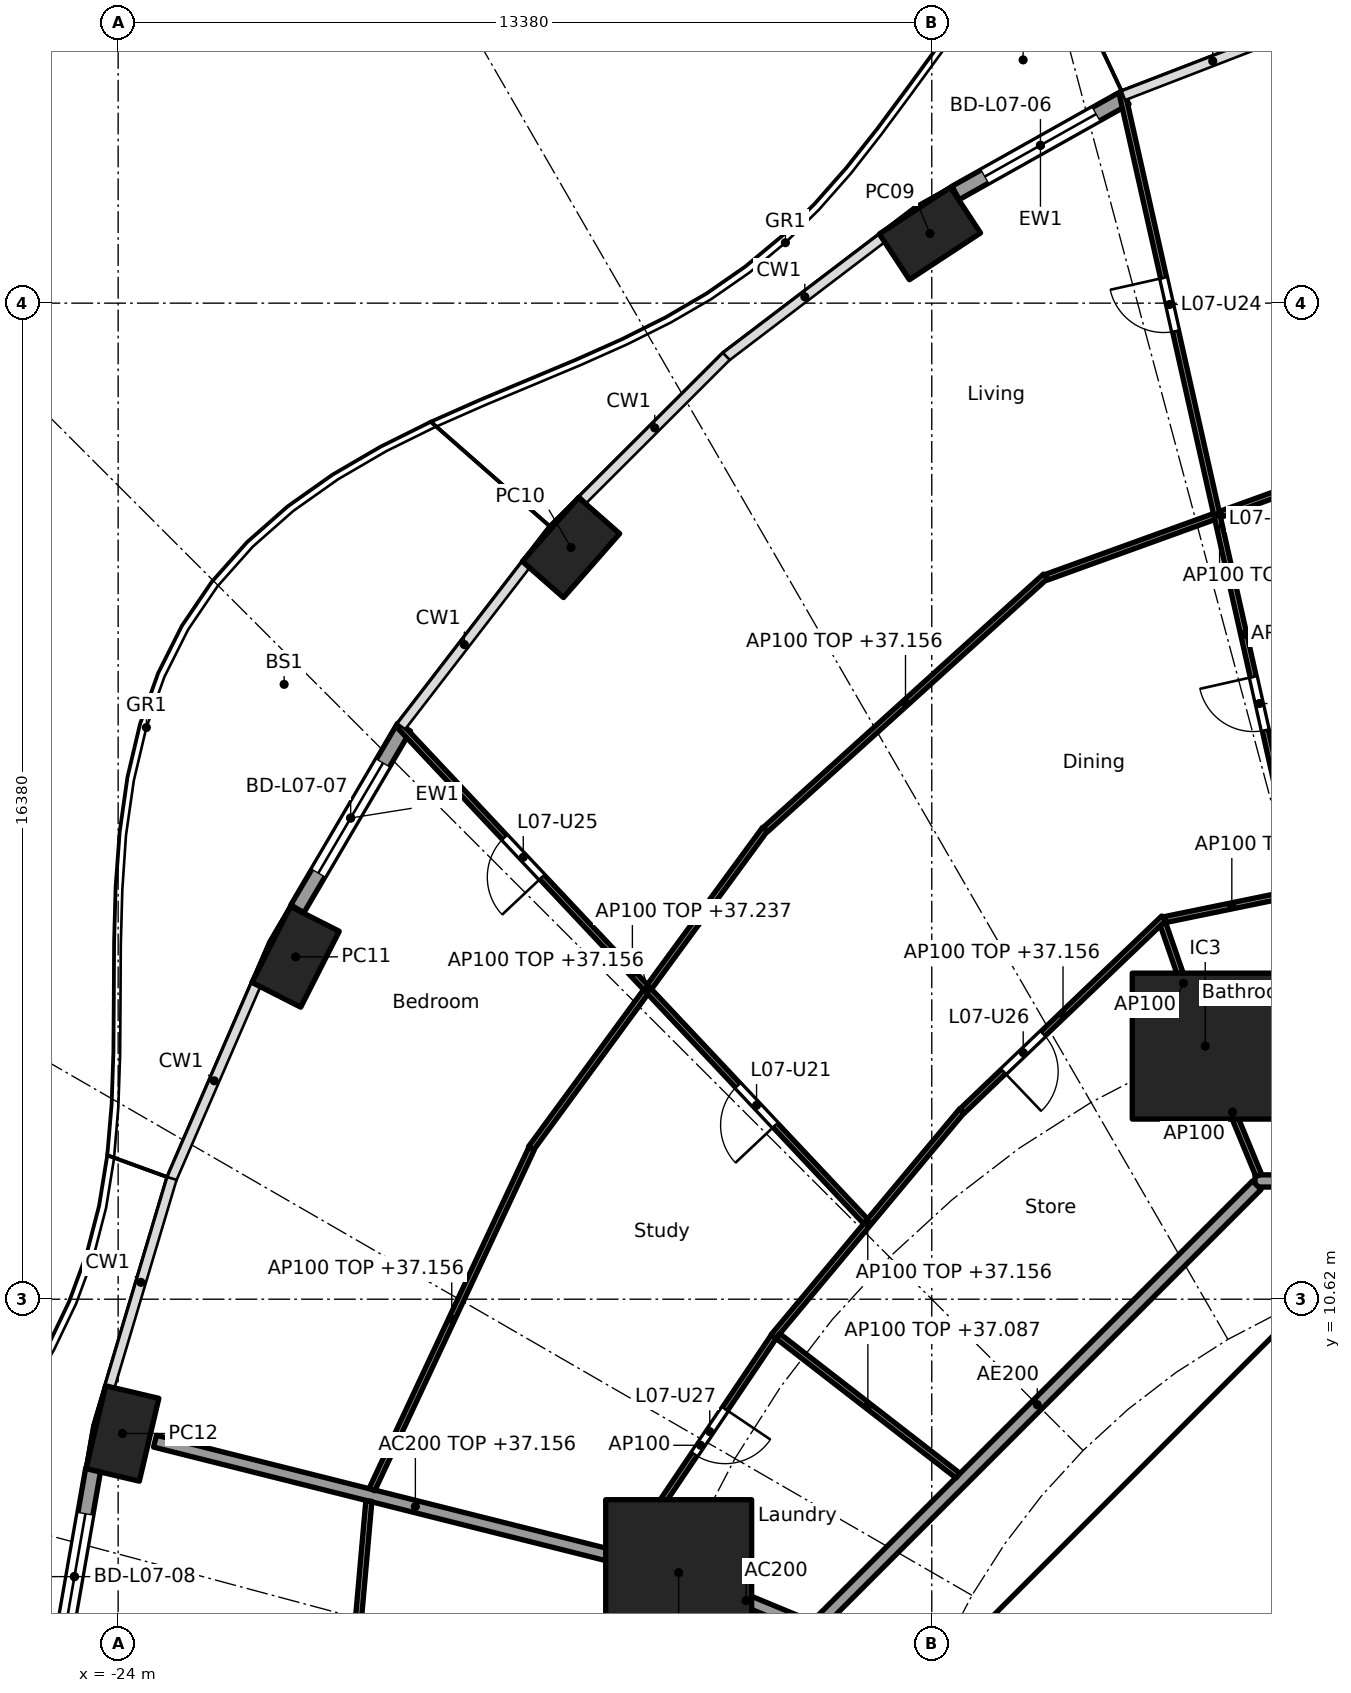
"""IFC4 building model, lengths in metres.
Left out: names, types, materials, properties, quantities, classifications, styles, units other than length and angle.
Written with IfcOpenShell. Run it as: python <this file> out.ifc"""

import sys

from ifc_helpers import new_model, si_unit, direction, frame, frame_2d, origin, origin_2d, place, context, subcontext, project, spatial, rectangle, hollow_rectangle, extrude, element, fill, save


model = new_model("IFC4")
c1 = context("Model", 3, precision=1e-05, world=origin(), true_north=direction((0.0, 1.0)))
c2 = subcontext(c1, "Body", "Model", "MODEL_VIEW")
j1 = project(units=[si_unit("LENGTHUNIT", "METRE"), si_unit("PLANEANGLEUNIT", "RADIAN")], contexts=[c1])
p1 = place(None, origin())
s1 = spatial("IfcSite", under=j1, at=p1, CompositionType="ELEMENT")
p2 = place(p1, origin())
s2 = spatial("IfcBuilding", under=s1, at=p2, CompositionType="ELEMENT")
p3 = place(p2, frame((0.0, 0.0, 34.4)))
s3 = spatial("IfcBuildingStorey", under=s2, at=p3, CompositionType="ELEMENT", Elevation=34.4)
for number, where, z_axis, x_axis in (
    (1, (-10.65, 28.146, 0.0), (0.0, 0.0, 1.0), (-0.836, -0.549, 0.0)),
    (2, (-16.552, 22.981, 0.0), (0.0, 0.0, 1.0), (-0.66, -0.751, 0.0)),
    (3, (-21.082, 16.25, 0.0), (0.0, 0.0, 1.0), (-0.452, -0.892, 0.0)),
    (4, (-23.929, 8.412, 0.0), (0.0, 0.0, 1.0), (-0.229, -0.973, 0.0)),
):
    element("IfcColumn", number, at=place(p3, frame(where, z_axis=z_axis, x_axis=x_axis)), inside=s3, PredefinedType="COLUMN", context=c2, shape_type="SweptSolid", body=[
        extrude(hollow_rectangle(XDim=1.4, YDim=0.9, WallThickness=0.05, at=origin_2d()), origin(), (0.0, 0.0, 1.0), 3.7),
    ])
for number, where, z_axis, x_axis in (
    (5, (-6.123, 14.782, 0.0), (0.0, 0.0, 1.0), (1.0, 0.0, 0.0)),
    (6, (-14.782, 6.123, 0.0), (0.0, 0.0, 1.0), (1.0, 0.0, 0.0)),
):
    element("IfcColumn", number, at=place(p3, frame(where, z_axis=z_axis, x_axis=x_axis)), inside=s3, PredefinedType="COLUMN", context=c2, shape_type="SweptSolid", body=[
        extrude(rectangle(XDim=2.4, YDim=2.4, at=origin_2d()), origin(), (0.0, 0.0, 1.0), 3.7),
    ])
p4 = place(p3, frame((-10.228, 28.812, 0.0), z_axis=(0.0, 0.0, 1.0), x_axis=(0.872084295691, 0.489355679653, 0.0)))
e7 = element("IfcWall", 7, at=p4, inside=s3, PredefinedType="SOLIDWALL", context=c2, shape_type="SweptSolid", body=[
    extrude(rectangle(XDim=3.201, YDim=0.25, at=frame_2d((1.601, 0.0))), origin(), (0.0, 0.0, 1.0), 3.44),
])
p5 = place(p4, frame((0.551, 0.0, 0.0)))
e8 = element("IfcOpeningElement", 8, at=p5, cuts=e7, PredefinedType="OPENING", context=c2, shape_type="SweptSolid", body=[
    extrude(rectangle(XDim=2.1, YDim=2.4, at=frame_2d((1.05, 1.2))), frame((0.0, 0.135, 0.0), z_axis=(0.0, -1.0, 0.0), x_axis=(1.0, 0.0, 0.0)), (0.0, 0.0, 1.0), 0.27),
])
p6 = place(p3, frame((-21.052, 17.04, 0.0), z_axis=(0.0, 0.0, 1.0), x_axis=(0.506311160839, 0.862350861546, 0.0)))
e9 = element("IfcWall", 9, at=p6, inside=s3, PredefinedType="SOLIDWALL", context=c2, shape_type="SweptSolid", body=[
    extrude(rectangle(XDim=3.462, YDim=0.25, at=frame_2d((1.731, 0.0))), origin(), (0.0, 0.0, 1.0), 3.44),
])
p7 = place(p6, frame((0.681, 0.0, 0.0)))
e10 = element("IfcOpeningElement", 10, at=p7, cuts=e9, PredefinedType="OPENING", context=c2, shape_type="SweptSolid", body=[
    extrude(rectangle(XDim=2.1, YDim=2.4, at=frame_2d((1.05, 1.2))), frame((0.0, 0.135, 0.0), z_axis=(0.0, -1.0, 0.0), x_axis=(1.0, 0.0, 0.0)), (0.0, 0.0, 1.0), 0.27),
])
p8 = place(p3, frame((-25.029, 4.286, 0.0), z_axis=(0.0, 0.0, 1.0), x_axis=(0.172217377323, 0.98505897029, 0.0)))
e11 = element("IfcWall", 11, at=p8, inside=s3, PredefinedType="SOLIDWALL", context=c2, shape_type="SweptSolid", body=[
    extrude(rectangle(XDim=3.598, YDim=0.25, at=frame_2d((1.799, 0.0))), origin(), (0.0, 0.0, 1.0), 3.44),
])
p9 = place(p8, frame((0.749, 0.0, 0.0)))
e12 = element("IfcOpeningElement", 12, at=p9, cuts=e11, PredefinedType="OPENING", context=c2, shape_type="SweptSolid", body=[
    extrude(rectangle(XDim=2.1, YDim=2.4, at=frame_2d((1.05, 1.2))), frame((0.0, 0.135, 0.0), z_axis=(0.0, -1.0, 0.0), x_axis=(1.0, 0.0, 0.0)), (0.0, 0.0, 1.0), 0.27),
])
p10 = place(p3, frame((-4.613, 9.988, 0.0), z_axis=(0.0, 0.0, 1.0), x_axis=(-0.707106781187, -0.707106781187, 0.0)))
e13 = element("IfcWall", 13, at=p10, inside=s3, PredefinedType="SHEAR", context=c2, shape_type="SweptSolid", body=[
    extrude(rectangle(XDim=7.602, YDim=0.6, at=frame_2d((3.801, 0.0))), origin(), (0.0, 0.0, 1.0), 3.44),
])
p11 = place(p10, frame((0.351, 0.0, 0.0)))
e14 = element("IfcOpeningElement", 14, at=p11, cuts=e13, PredefinedType="OPENING", context=c2, shape_type="SweptSolid", body=[
    extrude(rectangle(XDim=1.1, YDim=2.1, at=frame_2d((0.55, 1.05))), frame((0.0, 0.31, 0.0), z_axis=(0.0, -1.0, 0.0), x_axis=(1.0, 0.0, 0.0)), (0.0, 0.0, 1.0), 0.62),
])
p12 = place(p3, frame((-6.2, 4.3, 0.0), z_axis=(0.0, 0.0, 1.0), x_axis=(0.0, 1.0, 0.0)))
e15 = element("IfcWall", 15, at=p12, inside=s3, PredefinedType="PARTITIONING", context=c2, shape_type="SweptSolid", body=[
    extrude(rectangle(XDim=3.527, YDim=0.15, at=frame_2d((1.763, 0.0))), origin(), (0.0, 0.0, 1.0), 3.44),
])
p13 = place(p12, frame((0.262, 0.0, 0.0)))
e16 = element("IfcOpeningElement", 16, at=p13, cuts=e15, PredefinedType="OPENING", context=c2, shape_type="SweptSolid", body=[
    extrude(rectangle(XDim=0.9, YDim=2.1, at=frame_2d((0.45, 1.05))), frame((0.0, 0.085, 0.0), z_axis=(0.0, -1.0, 0.0), x_axis=(1.0, 0.0, 0.0)), (0.0, 0.0, 1.0), 0.17),
])
p14 = place(p12, frame((2.138, 0.0, 0.0)))
e17 = element("IfcOpeningElement", 17, at=p14, cuts=e15, PredefinedType="OPENING", context=c2, shape_type="SweptSolid", body=[
    extrude(rectangle(XDim=0.9, YDim=2.1, at=frame_2d((0.45, 1.05))), frame((0.0, 0.085, 0.0), z_axis=(0.0, -1.0, 0.0), x_axis=(1.0, 0.0, 0.0)), (0.0, 0.0, 1.0), 0.17),
])
p15 = place(p3, frame((-8.301, 5.8, 0.0), z_axis=(0.0, 0.0, 1.0), x_axis=(1.0, 0.0, 0.0)))
e18 = element("IfcWall", 18, at=p15, inside=s3, PredefinedType="PARTITIONING", context=c2, shape_type="SweptSolid", body=[
    extrude(rectangle(XDim=2.026, YDim=0.15, at=frame_2d((1.013, 0.0))), origin(), (0.0, 0.0, 1.0), 3.44),
])
p16 = place(p3, frame((-12.657, 5.243, 0.0), z_axis=(0.0, 0.0, 1.0), x_axis=(-0.923885664896, 0.382668627144, 0.0)))
e19 = element("IfcWall", 19, at=p16, inside=s3, PredefinedType="PARTITIONING", context=c2, shape_type="SweptSolid", body=[
    extrude(rectangle(XDim=2.2, YDim=0.2, at=frame_2d((1.1, 0.0))), origin(), (0.0, 0.0, 1.0), 3.44),
])
p17 = place(p3, frame((-14.831, 6.135, 0.0), z_axis=(0.0, 0.0, 1.0), x_axis=(-0.969884949569, 0.243563512454, 0.0)))
e20 = element("IfcWall", 20, at=p17, inside=s3, PredefinedType="PARTITIONING", context=c2, shape_type="SweptSolid", body=[
    extrude(rectangle(XDim=8.829, YDim=0.2, at=frame_2d((4.415, 0.0))), origin(), (0.0, 0.0, 1.0), 2.756),
])
p18 = place(p3, frame((5.104, 12.565, 0.0), z_axis=(0.0, 0.0, 1.0), x_axis=(-1.0, 0.0, 0.0)))
e21 = element("IfcWall", 21, at=p18, inside=s3, PredefinedType="PARTITIONING", context=c2, shape_type="SweptSolid", body=[
    extrude(rectangle(XDim=10.409, YDim=0.2, at=frame_2d((5.205, 0.0))), origin(), (0.0, 0.0, 1.0), 3.44),
])
p19 = place(p18, frame((6.339, 0.0, 0.0)))
e22 = element("IfcOpeningElement", 22, at=p19, cuts=e21, PredefinedType="OPENING", context=c2, shape_type="SweptSolid", body=[
    extrude(rectangle(XDim=1.0, YDim=2.1, at=frame_2d((0.5, 1.05))), frame((0.0, 0.11, 0.0), z_axis=(0.0, -1.0, 0.0), x_axis=(1.0, 0.0, 0.0)), (0.0, 0.0, 1.0), 0.22),
])
p20 = place(p3, frame((-5.275, 12.494, 0.0), z_axis=(0.0, 0.0, 1.0), x_axis=(-0.707106781187, -0.707106781187, 0.0)))
e23 = element("IfcWall", 23, at=p20, inside=s3, PredefinedType="PARTITIONING", context=c2, shape_type="SweptSolid", body=[
    extrude(rectangle(XDim=10.209, YDim=0.2, at=frame_2d((5.104, 0.0))), origin(), (0.0, 0.0, 1.0), 3.44),
])
p21 = place(p3, frame((-3.034, 24.554, 0.0), z_axis=(0.0, 0.0, 1.0), x_axis=(-0.940401691072, -0.340065669288, 0.0)))
e24 = element("IfcWall", 24, at=p21, inside=s3, PredefinedType="PARTITIONING", context=c2, shape_type="SweptSolid", body=[
    extrude(rectangle(XDim=6.067, YDim=0.1, at=frame_2d((3.034, 0.0))), origin(), (0.0, 0.0, 1.0), 2.756),
])
p22 = place(p21, frame((1.117, 0.0, 0.0)))
e25 = element("IfcOpeningElement", 25, at=p22, cuts=e24, PredefinedType="OPENING", context=c2, shape_type="SweptSolid", body=[
    extrude(rectangle(XDim=0.9, YDim=2.1, at=frame_2d((0.45, 1.05))), frame((0.0, 0.06, 0.0), z_axis=(0.0, -1.0, 0.0), x_axis=(1.0, 0.0, 0.0)), (0.0, 0.0, 1.0), 0.12),
])
p23 = place(p3, frame((-3.492, 12.662, 0.0), z_axis=(0.0, 0.0, 1.0), x_axis=(-0.219268088006, 0.975664648115, 0.0)))
e26 = element("IfcWall", 26, at=p23, inside=s3, PredefinedType="PARTITIONING", context=c2, shape_type="SweptSolid", body=[
    extrude(rectangle(XDim=18.23, YDim=0.1, at=frame_2d((9.115, 0.0))), origin(), (0.0, 0.0, 1.0), 2.687),
])
p24 = place(p23, frame((0.35, 0.0, 0.0)))
e27 = element("IfcOpeningElement", 27, at=p24, cuts=e26, PredefinedType="OPENING", context=c2, shape_type="SweptSolid", body=[
    extrude(rectangle(XDim=0.9, YDim=2.1, at=frame_2d((0.45, 1.05))), frame((0.0, 0.06, 0.0), z_axis=(0.0, -1.0, 0.0), x_axis=(1.0, 0.0, 0.0)), (0.0, 0.0, 1.0), 0.12),
])
p25 = place(p23, frame((7.497, 0.0, 0.0)))
e28 = element("IfcOpeningElement", 28, at=p25, cuts=e26, PredefinedType="OPENING", context=c2, shape_type="SweptSolid", body=[
    extrude(rectangle(XDim=0.9, YDim=2.1, at=frame_2d((0.45, 1.05))), frame((0.0, 0.06, 0.0), z_axis=(0.0, -1.0, 0.0), x_axis=(1.0, 0.0, 0.0)), (0.0, 0.0, 1.0), 0.12),
])
p26 = place(p23, frame((14.223, 0.0, 0.0)))
e29 = element("IfcOpeningElement", 29, at=p26, cuts=e26, PredefinedType="OPENING", context=c2, shape_type="SweptSolid", body=[
    extrude(rectangle(XDim=0.9, YDim=2.1, at=frame_2d((0.45, 1.05))), frame((0.0, 0.06, 0.0), z_axis=(0.0, -1.0, 0.0), x_axis=(1.0, 0.0, 0.0)), (0.0, 0.0, 1.0), 0.12),
])
p27 = place(p3, frame((-4.58, 17.315, 0.0), z_axis=(0.0, 0.0, 1.0), x_axis=(-0.979581941859, -0.201045316246, 0.0)))
e30 = element("IfcWall", 30, at=p27, inside=s3, PredefinedType="PARTITIONING", context=c2, shape_type="SweptSolid", body=[
    extrude(rectangle(XDim=2.256, YDim=0.1, at=frame_2d((1.128, 0.0))), origin(), (0.0, 0.0, 1.0), 2.756),
])
p28 = place(p3, frame((-5.243, 12.657, 0.0), z_axis=(0.0, 0.0, 1.0), x_axis=(-0.382719158442, 0.923864733477, 0.0)))
e31 = element("IfcWall", 31, at=p28, inside=s3, PredefinedType="PARTITIONING", context=c2, shape_type="SweptSolid", body=[
    extrude(rectangle(XDim=2.25, YDim=0.1, at=frame_2d((1.125, 0.0))), origin(), (0.0, 0.0, 1.0), 3.44),
])
p29 = place(p3, frame((-6.139, 14.83, 0.0), z_axis=(0.0, 0.0, 1.0), x_axis=(-0.327246993321, 0.944938836837, 0.0)))
e32 = element("IfcWall", 32, at=p29, inside=s3, PredefinedType="PARTITIONING", context=c2, shape_type="SweptSolid", body=[
    extrude(rectangle(XDim=2.09, YDim=0.1, at=frame_2d((1.045, 0.0))), origin(), (0.0, 0.0, 1.0), 3.44),
])
p30 = place(p3, frame((-6.803, 16.886, 0.0), z_axis=(0.0, 0.0, 1.0), x_axis=(-0.722763212502, -0.69109575216, 0.0)))
e33 = element("IfcWall", 33, at=p30, inside=s3, PredefinedType="PARTITIONING", context=c2, shape_type="SweptSolid", body=[
    extrude(rectangle(XDim=4.587, YDim=0.1, at=frame_2d((2.293, 0.0))), origin(), (0.0, 0.0, 1.0), 2.756),
])
p31 = place(p30, frame((2.75, 0.0, 0.0)))
e34 = element("IfcOpeningElement", 34, at=p31, cuts=e33, PredefinedType="OPENING", context=c2, shape_type="SweptSolid", body=[
    extrude(rectangle(XDim=0.9, YDim=2.1, at=frame_2d((0.45, 1.05))), frame((0.0, 0.06, 0.0), z_axis=(0.0, -1.0, 0.0), x_axis=(1.0, 0.0, 0.0)), (0.0, 0.0, 1.0), 0.12),
])
p32 = place(p3, frame((-8.749, 22.508, 0.0), z_axis=(0.0, 0.0, 1.0), x_axis=(-0.741720189244, -0.670709445936, 0.0)))
e35 = element("IfcWall", 35, at=p32, inside=s3, PredefinedType="PARTITIONING", context=c2, shape_type="SweptSolid", body=[
    extrude(rectangle(XDim=6.209, YDim=0.1, at=frame_2d((3.104, 0.0))), origin(), (0.0, 0.0, 1.0), 2.756),
])
p33 = place(p3, frame((-10.123, 13.72, 0.0), z_axis=(0.0, 0.0, 1.0), x_axis=(-0.64083455704, -0.767679015282, 0.0)))
e36 = element("IfcWall", 36, at=p33, inside=s3, PredefinedType="PARTITIONING", context=c2, shape_type="SweptSolid", body=[
    extrude(rectangle(XDim=4.837, YDim=0.1, at=frame_2d((2.418, 0.0))), origin(), (0.0, 0.0, 1.0), 2.756),
])
p34 = place(p3, frame((-13.362, 18.35, 0.0), z_axis=(0.0, 0.0, 1.0), x_axis=(-0.591191311491, -0.806531359104, 0.0)))
e37 = element("IfcWall", 37, at=p34, inside=s3, PredefinedType="PARTITIONING", context=c2, shape_type="SweptSolid", body=[
    extrude(rectangle(XDim=6.51, YDim=0.1, at=frame_2d((3.255, 0.0))), origin(), (0.0, 0.0, 1.0), 2.756),
])
p35 = place(p3, frame((-11.707, 11.9, 0.0), z_axis=(0.0, 0.0, 1.0), x_axis=(-0.685030806147, 0.728514100501, 0.0)))
e38 = element("IfcWall", 38, at=p35, inside=s3, PredefinedType="PARTITIONING", context=c2, shape_type="SweptSolid", body=[
    extrude(rectangle(XDim=11.201, YDim=0.1, at=frame_2d((5.601, 0.0))), origin(), (0.0, 0.0, 1.0), 2.837),
])
p36 = place(p35, frame((2.169, 0.0, 0.0)))
e39 = element("IfcOpeningElement", 39, at=p36, cuts=e38, PredefinedType="OPENING", context=c2, shape_type="SweptSolid", body=[
    extrude(rectangle(XDim=0.9, YDim=2.1, at=frame_2d((0.45, 1.05))), frame((0.0, 0.06, 0.0), z_axis=(0.0, -1.0, 0.0), x_axis=(1.0, 0.0, 0.0)), (0.0, 0.0, 1.0), 0.12),
])
p37 = place(p35, frame((7.77, 0.0, 0.0)))
e40 = element("IfcOpeningElement", 40, at=p37, cuts=e38, PredefinedType="OPENING", context=c2, shape_type="SweptSolid", body=[
    extrude(rectangle(XDim=0.9, YDim=2.1, at=frame_2d((0.45, 1.05))), frame((0.0, 0.06, 0.0), z_axis=(0.0, -1.0, 0.0), x_axis=(1.0, 0.0, 0.0)), (0.0, 0.0, 1.0), 0.12),
])
p38 = place(p3, frame((-10.19, 7.719, 0.0), z_axis=(0.0, 0.0, 1.0), x_axis=(-0.790253294643, 0.612780327937, 0.0)))
e41 = element("IfcWall", 41, at=p38, inside=s3, PredefinedType="PARTITIONING", context=c2, shape_type="SweptSolid", body=[
    extrude(rectangle(XDim=3.746, YDim=0.1, at=frame_2d((1.873, 0.0))), origin(), (0.0, 0.0, 1.0), 2.687),
])
p39 = place(p3, frame((-13.218, 10.004, 0.0), z_axis=(0.0, 0.0, 1.0), x_axis=(-0.559112679527, -0.829091678641, 0.0)))
e42 = element("IfcWall", 42, at=p39, inside=s3, PredefinedType="PARTITIONING", context=c2, shape_type="SweptSolid", body=[
    extrude(rectangle(XDim=4.308, YDim=0.1, at=frame_2d((2.154, 0.0))), origin(), (0.0, 0.0, 1.0), 3.44),
])
p40 = place(p39, frame((1.433, 0.0, 0.0)))
e43 = element("IfcOpeningElement", 43, at=p40, cuts=e42, PredefinedType="OPENING", context=c2, shape_type="SweptSolid", body=[
    extrude(rectangle(XDim=0.9, YDim=2.1, at=frame_2d((0.45, 1.05))), frame((0.0, 0.06, 0.0), z_axis=(0.0, -1.0, 0.0), x_axis=(1.0, 0.0, 0.0)), (0.0, 0.0, 1.0), 0.12),
])
p41 = place(p3, frame((-17.203, 13.095, 0.0), z_axis=(0.0, 0.0, 1.0), x_axis=(-0.423926333401, -0.905696673202, 0.0)))
e44 = element("IfcWall", 44, at=p41, inside=s3, PredefinedType="PARTITIONING", context=c2, shape_type="SweptSolid", body=[
    extrude(rectangle(XDim=6.188, YDim=0.1, at=frame_2d((3.094, 0.0))), origin(), (0.0, 0.0, 1.0), 2.756),
])
p42 = place(p3, frame((-15.688, 6.249, 0.0), z_axis=(0.0, 0.0, 1.0), x_axis=(-0.054659814056, -0.998505034903, 0.0)))
e45 = element("IfcWall", 45, at=p42, inside=s3, PredefinedType="PARTITIONING", context=c2, shape_type="SweptSolid", body=[
    extrude(rectangle(XDim=6.208, YDim=0.1, at=frame_2d((3.104, 0.0))), origin(), (0.0, 0.0, 1.0), 2.756),
])
p43 = place(p3, frame((-19.877, 7.301, 0.0), z_axis=(0.0, 0.0, 1.0), x_axis=(-0.088143415068, -0.996107794558, 0.0)))
e46 = element("IfcWall", 46, at=p43, inside=s3, PredefinedType="PARTITIONING", context=c2, shape_type="SweptSolid", body=[
    extrude(rectangle(XDim=7.279, YDim=0.1, at=frame_2d((3.64, 0.0))), origin(), (0.0, 0.0, 1.0), 2.756),
])
p44 = place(p5, origin())
e47 = element("IfcDoor", 47, at=p44, inside=s3, OperationType="SLIDING_TO_LEFT", PredefinedType="DOOR", context=c2, shape_type="SweptSolid", body=[
    extrude(rectangle(XDim=2.1, YDim=2.4, at=frame_2d((1.05, 1.2))), frame((0.0, 0.025, 0.0), z_axis=(0.0, -1.0, 0.0), x_axis=(1.0, 0.0, 0.0)), (0.0, 0.0, 1.0), 0.05),
])
fill(e8, e47)
p45 = place(p7, origin())
e48 = element("IfcDoor", 48, at=p45, inside=s3, OperationType="SLIDING_TO_LEFT", PredefinedType="DOOR", context=c2, shape_type="SweptSolid", body=[
    extrude(rectangle(XDim=2.1, YDim=2.4, at=frame_2d((1.05, 1.2))), frame((0.0, 0.025, 0.0), z_axis=(0.0, -1.0, 0.0), x_axis=(1.0, 0.0, 0.0)), (0.0, 0.0, 1.0), 0.05),
])
fill(e10, e48)
p46 = place(p9, origin())
e49 = element("IfcDoor", 49, at=p46, inside=s3, OperationType="SLIDING_TO_LEFT", PredefinedType="DOOR", context=c2, shape_type="SweptSolid", body=[
    extrude(rectangle(XDim=2.1, YDim=2.4, at=frame_2d((1.05, 1.2))), frame((0.0, 0.025, 0.0), z_axis=(0.0, -1.0, 0.0), x_axis=(1.0, 0.0, 0.0)), (0.0, 0.0, 1.0), 0.05),
])
fill(e12, e49)
p47 = place(p14, origin())
e50 = element("IfcDoor", 50, at=p47, inside=s3, OperationType="SINGLE_SWING_RIGHT", PredefinedType="DOOR", context=c2, shape_type="SweptSolid", body=[
    extrude(rectangle(XDim=0.9, YDim=2.1, at=frame_2d((0.45, 1.05))), frame((0.0, 0.025, 0.0), z_axis=(0.0, -1.0, 0.0), x_axis=(1.0, 0.0, 0.0)), (0.0, 0.0, 1.0), 0.05),
])
fill(e17, e50)
p48 = place(p11, origin())
e51 = element("IfcDoor", 51, at=p48, inside=s3, OperationType="SINGLE_SWING_RIGHT", PredefinedType="DOOR", context=c2, shape_type="SweptSolid", body=[
    extrude(rectangle(XDim=1.1, YDim=2.1, at=frame_2d((0.55, 1.05))), frame((0.0, 0.025, 0.0), z_axis=(0.0, -1.0, 0.0), x_axis=(1.0, 0.0, 0.0)), (0.0, 0.0, 1.0), 0.05),
])
fill(e14, e51)
p49 = place(p25, origin())
e52 = element("IfcDoor", 52, at=p49, inside=s3, OperationType="SINGLE_SWING_RIGHT", PredefinedType="DOOR", context=c2, shape_type="SweptSolid", body=[
    extrude(rectangle(XDim=0.9, YDim=2.1, at=frame_2d((0.45, 1.05))), frame((0.0, 0.025, 0.0), z_axis=(0.0, -1.0, 0.0), x_axis=(1.0, 0.0, 0.0)), (0.0, 0.0, 1.0), 0.05),
])
fill(e28, e52)
p50 = place(p36, origin())
e53 = element("IfcDoor", 53, at=p50, inside=s3, OperationType="SINGLE_SWING_LEFT", PredefinedType="DOOR", context=c2, shape_type="SweptSolid", body=[
    extrude(rectangle(XDim=0.9, YDim=2.1, at=frame_2d((0.45, 1.05))), frame((0.0, 0.025, 0.0), z_axis=(0.0, -1.0, 0.0), x_axis=(1.0, 0.0, 0.0)), (0.0, 0.0, 1.0), 0.05),
])
fill(e39, e53)
p51 = place(p26, origin())
e54 = element("IfcDoor", 54, at=p51, inside=s3, OperationType="SINGLE_SWING_RIGHT", PredefinedType="DOOR", context=c2, shape_type="SweptSolid", body=[
    extrude(rectangle(XDim=0.9, YDim=2.1, at=frame_2d((0.45, 1.05))), frame((0.0, 0.025, 0.0), z_axis=(0.0, -1.0, 0.0), x_axis=(1.0, 0.0, 0.0)), (0.0, 0.0, 1.0), 0.05),
])
fill(e29, e54)
p52 = place(p37, origin())
e55 = element("IfcDoor", 55, at=p52, inside=s3, OperationType="SINGLE_SWING_LEFT", PredefinedType="DOOR", context=c2, shape_type="SweptSolid", body=[
    extrude(rectangle(XDim=0.9, YDim=2.1, at=frame_2d((0.45, 1.05))), frame((0.0, 0.025, 0.0), z_axis=(0.0, -1.0, 0.0), x_axis=(1.0, 0.0, 0.0)), (0.0, 0.0, 1.0), 0.05),
])
fill(e40, e55)
p53 = place(p31, origin())
e56 = element("IfcDoor", 56, at=p53, inside=s3, OperationType="SINGLE_SWING_RIGHT", PredefinedType="DOOR", context=c2, shape_type="SweptSolid", body=[
    extrude(rectangle(XDim=0.9, YDim=2.1, at=frame_2d((0.45, 1.05))), frame((0.0, 0.025, 0.0), z_axis=(0.0, -1.0, 0.0), x_axis=(1.0, 0.0, 0.0)), (0.0, 0.0, 1.0), 0.05),
])
fill(e34, e56)
p54 = place(p40, origin())
e57 = element("IfcDoor", 57, at=p54, inside=s3, OperationType="SINGLE_SWING_LEFT", PredefinedType="DOOR", context=c2, shape_type="SweptSolid", body=[
    extrude(rectangle(XDim=0.9, YDim=2.1, at=frame_2d((0.45, 1.05))), frame((0.0, 0.025, 0.0), z_axis=(0.0, -1.0, 0.0), x_axis=(1.0, 0.0, 0.0)), (0.0, 0.0, 1.0), 0.05),
])
fill(e43, e57)
save(model, sys.argv[1])
